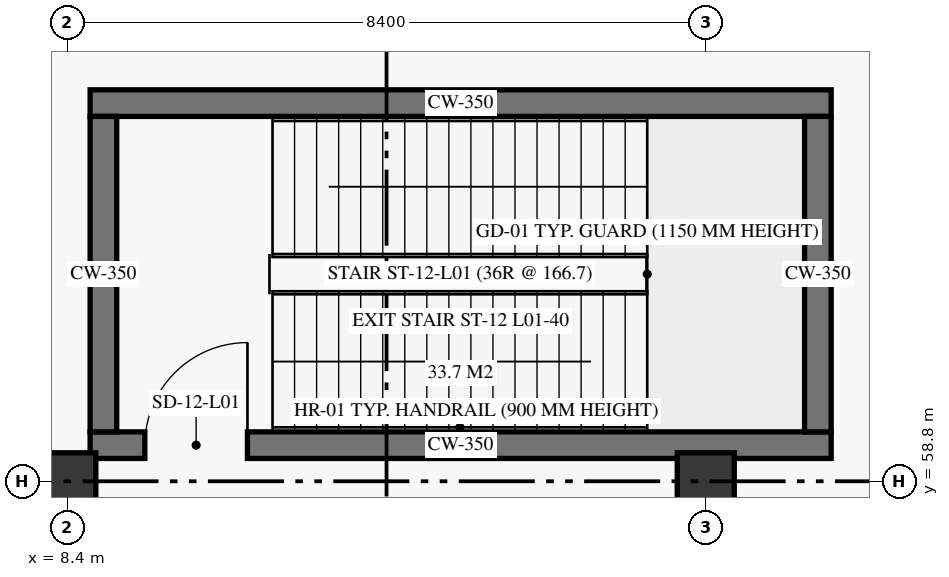
"""IFC4 building model, lengths in metres.
Left out: names, types, materials, properties, quantities, classifications, styles, units other than length and angle.
Written with IfcOpenShell. Run it as: python <this file> out.ifc"""

import sys

from ifc_helpers import new_model, si_unit, direction, frame, frame_2d, origin, origin_2d, place, context, subcontext, project, spatial, rectangle, extrude, element, fill, save


model = new_model("IFC4")
c1 = context("Model", 3, precision=1e-05, world=origin(), true_north=direction((0.0, 1.0)))
c2 = subcontext(c1, "Body", "Model", "MODEL_VIEW")
j1 = project(units=[si_unit("LENGTHUNIT", "METRE"), si_unit("PLANEANGLEUNIT", "RADIAN")], contexts=[c1])
p1 = place(None, origin())
s1 = spatial("IfcSite", under=j1, at=p1, CompositionType="ELEMENT")
p2 = place(p1, origin())
s2 = spatial("IfcBuilding", under=s1, at=p2, CompositionType="ELEMENT")
p3 = place(p2, origin())
s3 = spatial("IfcBuildingStorey", under=s2, at=p3, CompositionType="ELEMENT", Elevation=0.0)
for number, where, z_axis, x_axis in (
    (1, (8.4, 58.8, 0.0), (0.0, 0.0, 1.0), (1.0, 0.0, 0.0)),
    (2, (16.8, 58.8, 0.0), (0.0, 0.0, 1.0), (1.0, 0.0, 0.0)),
):
    element("IfcColumn", number, at=place(p3, frame(where, z_axis=z_axis, x_axis=x_axis)), inside=s3, PredefinedType="COLUMN", context=c2, shape_type="SweptSolid", body=[
        extrude(rectangle(XDim=0.75, YDim=0.75, at=origin_2d()), origin(), (0.0, 0.0, 1.0), 5.7),
    ])
p4 = place(p3, frame((8.7, 59.275, 0.0), z_axis=(0.0, 0.0, 1.0), x_axis=(1.0, 0.0, 0.0)))
e3 = element("IfcWall", 3, at=p4, inside=s3, PredefinedType="SHEAR", context=c2, shape_type="SweptSolid", body=[
    extrude(rectangle(XDim=9.75, YDim=0.35, at=frame_2d((4.875, 0.0))), origin(), (0.0, 0.0, 1.0), 5.7),
])
p5 = place(p4, frame((0.72, 0.0, 0.0)))
e4 = element("IfcOpeningElement", 4, at=p5, cuts=e3, PredefinedType="OPENING", context=c2, shape_type="SweptSolid", body=[
    extrude(rectangle(XDim=1.35, YDim=2.25, at=frame_2d((0.675, 1.125))), frame((0.0, 0.185, 0.0), z_axis=(0.0, -1.0, 0.0), x_axis=(1.0, 0.0, 0.0)), (0.0, 0.0, 1.0), 0.37),
])
p6 = place(p3, frame((8.7, 63.775, 0.0), z_axis=(0.0, 0.0, 1.0), x_axis=(1.0, 0.0, 0.0)))
e5 = element("IfcWall", 5, at=p6, inside=s3, PredefinedType="SHEAR", context=c2, shape_type="SweptSolid", body=[
    extrude(rectangle(XDim=9.75, YDim=0.35, at=frame_2d((4.875, 0.0))), origin(), (0.0, 0.0, 1.0), 5.7),
])
for number, where, z_axis, x_axis in (
    (6, (8.875, 59.45, 0.0), (0.0, 0.0, 1.0), (0.0, 1.0, 0.0)),
    (7, (18.275, 59.45, 0.0), (0.0, 0.0, 1.0), (0.0, 1.0, 0.0)),
):
    element("IfcWall", number, at=place(p3, frame(where, z_axis=z_axis, x_axis=x_axis)), inside=s3, PredefinedType="SHEAR", context=c2, shape_type="SweptSolid", body=[
        extrude(rectangle(XDim=4.15, YDim=0.35, at=frame_2d((2.075, 0.0))), origin(), (0.0, 0.0, 1.0), 5.7),
    ])
p7 = place(p5, origin())
e8 = element("IfcDoor", 8, at=p7, inside=s3, OperationType="SINGLE_SWING_RIGHT", PredefinedType="DOOR", context=c2, shape_type="SweptSolid", body=[
    extrude(rectangle(XDim=1.35, YDim=2.25, at=frame_2d((0.675, 1.125))), frame((0.0, 0.025, 0.0), z_axis=(0.0, -1.0, 0.0), x_axis=(1.0, 0.0, 0.0)), (0.0, 0.0, 1.0), 0.05),
])
fill(e4, e8)
save(model, sys.argv[1])
